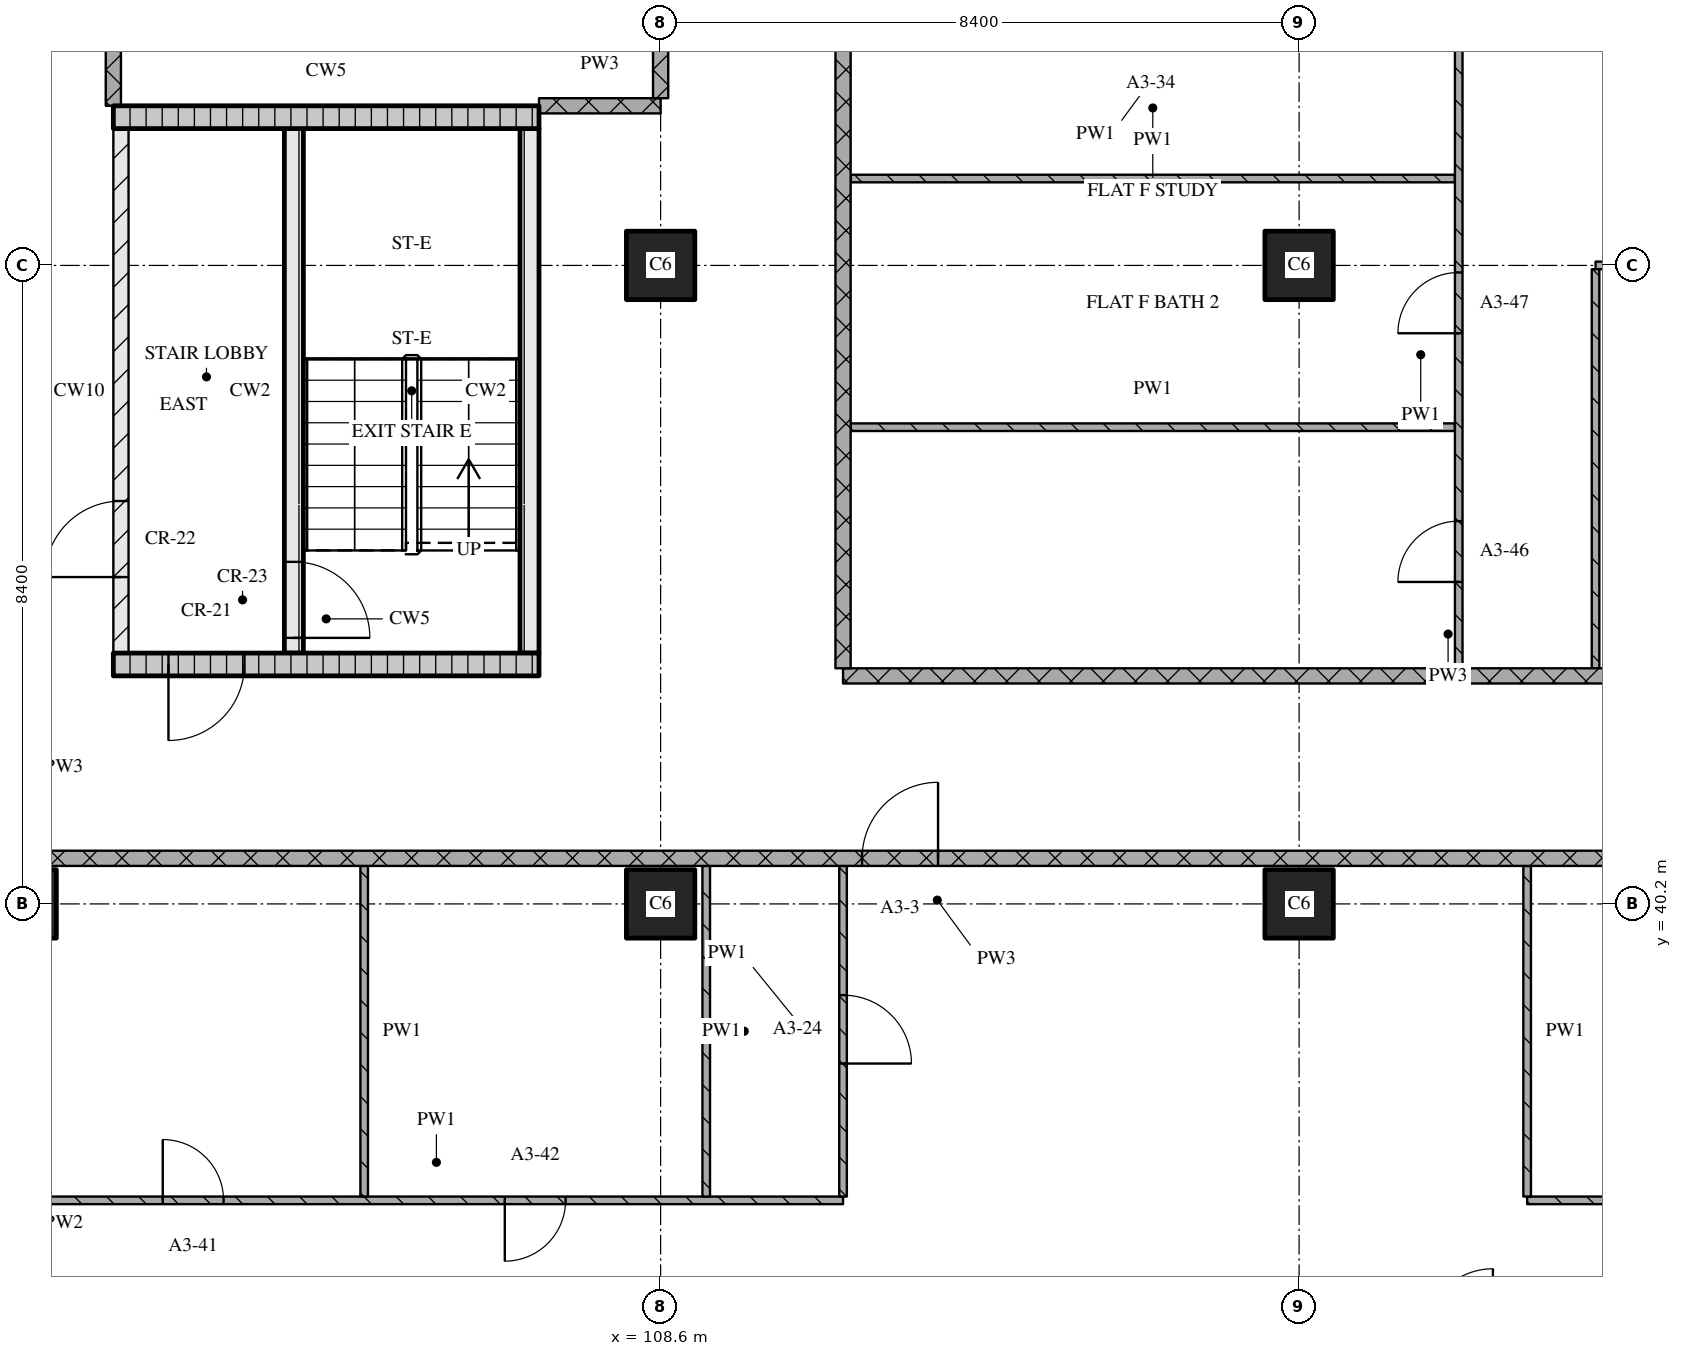
"""IFC4 building model, lengths in metres.
Left out: names, types, materials, properties, quantities, classifications, styles, units other than length and angle.
Written with IfcOpenShell. Run it as: python <this file> out.ifc"""

import sys

from ifc_helpers import new_model, si_unit, direction, frame, frame_2d, origin, origin_2d, place, context, subcontext, project, spatial, rectangle, extrude, element, fill, save


model = new_model("IFC4")
c1 = context("Model", 3, precision=1e-05, world=origin(), true_north=direction((0.0, 1.0)))
c2 = subcontext(c1, "Body", "Model", "MODEL_VIEW")
j1 = project(units=[si_unit("LENGTHUNIT", "METRE"), si_unit("PLANEANGLEUNIT", "RADIAN")], contexts=[c1])
p1 = place(None, origin())
s1 = spatial("IfcSite", under=j1, at=p1, CompositionType="ELEMENT")
p2 = place(p1, origin())
s2 = spatial("IfcBuilding", under=s1, at=p2, CompositionType="ELEMENT")
p3 = place(p2, frame((0.0, 0.0, 58.8)))
s3 = spatial("IfcBuildingStorey", under=s2, at=p3, CompositionType="ELEMENT", Elevation=58.8)
for number, where, z_axis, x_axis in (
    (1, (100.2, 40.2, 0.0), (0.0, 0.0, 1.0), (1.0, 0.0, 0.0)),
    (2, (108.6, 40.2, 0.0), (0.0, 0.0, 1.0), (1.0, 0.0, 0.0)),
    (3, (108.6, 48.6, 0.0), (0.0, 0.0, 1.0), (1.0, 0.0, 0.0)),
    (4, (117.0, 40.2, 0.0), (0.0, 0.0, 1.0), (1.0, 0.0, 0.0)),
    (5, (117.0, 48.6, 0.0), (0.0, 0.0, 1.0), (1.0, 0.0, 0.0)),
):
    element("IfcColumn", number, at=place(p3, frame(where, z_axis=z_axis, x_axis=x_axis)), inside=s3, PredefinedType="COLUMN", context=c2, shape_type="SweptSolid", body=[
        extrude(rectangle(XDim=0.9, YDim=0.9, at=origin_2d()), origin(), (0.0, 0.0, 1.0), 3.6),
    ])
p4 = place(p3, frame((101.4, 43.35, 0.0), z_axis=(0.0, 0.0, 1.0), x_axis=(1.0, 0.0, 0.0)))
e6 = element("IfcWall", 6, at=p4, inside=s3, PredefinedType="SOLIDWALL", context=c2, shape_type="SweptSolid", body=[
    extrude(rectangle(XDim=5.6, YDim=0.3, at=frame_2d((2.8, 0.0))), origin(), (0.0, 0.0, 1.0), 3.32),
])
p5 = place(p4, frame((0.725, 0.0, 0.0)))
e7 = element("IfcOpeningElement", 7, at=p5, cuts=e6, PredefinedType="OPENING", context=c2, shape_type="SweptSolid", body=[
    extrude(rectangle(XDim=1.0, YDim=2.1, at=frame_2d((0.5, 1.05))), frame((0.0, 0.16, 0.0), z_axis=(0.0, -1.0, 0.0), x_axis=(1.0, 0.0, 0.0)), (0.0, 0.0, 1.0), 0.32),
])
p6 = place(p3, frame((101.5, 43.5, 0.0), z_axis=(0.0, 0.0, 1.0), x_axis=(0.0, 1.0, 0.0)))
e8 = element("IfcWall", 8, at=p6, inside=s3, PredefinedType="PARTITIONING", context=c2, shape_type="SweptSolid", body=[
    extrude(rectangle(XDim=6.9, YDim=0.2, at=frame_2d((3.45, 0.0))), origin(), (0.0, 0.0, 1.0), 3.32),
])
p7 = place(p6, frame((1.0, 0.0, 0.0)))
e9 = element("IfcOpeningElement", 9, at=p7, cuts=e8, PredefinedType="OPENING", context=c2, shape_type="SweptSolid", body=[
    extrude(rectangle(XDim=1.0, YDim=2.1, at=frame_2d((0.5, 1.05))), frame((0.0, 0.11, 0.0), z_axis=(0.0, -1.0, 0.0), x_axis=(1.0, 0.0, 0.0)), (0.0, 0.0, 1.0), 0.22),
])
p8 = place(p3, frame((103.775, 43.5, 0.0), z_axis=(0.0, 0.0, 1.0), x_axis=(0.0, 1.0, 0.0)))
e10 = element("IfcWall", 10, at=p8, inside=s3, PredefinedType="SOLIDWALL", context=c2, shape_type="SweptSolid", body=[
    extrude(rectangle(XDim=6.9, YDim=0.25, at=frame_2d((3.45, 0.0))), origin(), (0.0, 0.0, 1.0), 3.32),
])
p9 = place(p8, frame((0.2, 0.0, 0.0)))
e11 = element("IfcOpeningElement", 11, at=p9, cuts=e10, PredefinedType="OPENING", context=c2, shape_type="SweptSolid", body=[
    extrude(rectangle(XDim=1.0, YDim=2.1, at=frame_2d((0.5, 1.05))), frame((0.0, 0.135, 0.0), z_axis=(0.0, -1.0, 0.0), x_axis=(1.0, 0.0, 0.0)), (0.0, 0.0, 1.0), 0.27),
])
p10 = place(p3, frame((106.875, 43.5, 0.0), z_axis=(0.0, 0.0, 1.0), x_axis=(0.0, 1.0, 0.0)))
e12 = element("IfcWall", 12, at=p10, inside=s3, PredefinedType="SOLIDWALL", context=c2, shape_type="SweptSolid", body=[
    extrude(rectangle(XDim=6.9, YDim=0.25, at=frame_2d((3.45, 0.0))), origin(), (0.0, 0.0, 1.0), 3.32),
])
p11 = place(p3, frame((101.4, 50.55, 0.0), z_axis=(0.0, 0.0, 1.0), x_axis=(1.0, 0.0, 0.0)))
e13 = element("IfcWall", 13, at=p11, inside=s3, PredefinedType="SOLIDWALL", context=c2, shape_type="SweptSolid", body=[
    extrude(rectangle(XDim=5.6, YDim=0.3, at=frame_2d((2.8, 0.0))), origin(), (0.0, 0.0, 1.0), 3.32),
])
p12 = place(p3, frame((100.3, 36.3, 0.0), z_axis=(0.0, 0.0, 1.0), x_axis=(1.0, 0.0, 0.0)))
e14 = element("IfcWall", 14, at=p12, inside=s3, PredefinedType="PARTITIONING", context=c2, shape_type="SweptSolid", body=[
    extrude(rectangle(XDim=10.7, YDim=0.1, at=frame_2d((5.35, 0.0))), origin(), (0.0, 0.0, 1.0), 3.32),
])
p13 = place(p12, frame((1.75, 0.0, 0.0)))
e15 = element("IfcOpeningElement", 15, at=p13, cuts=e14, PredefinedType="OPENING", context=c2, shape_type="SweptSolid", body=[
    extrude(rectangle(XDim=0.8, YDim=2.1, at=frame_2d((0.4, 1.05))), frame((0.0, 0.06, 0.0), z_axis=(0.0, -1.0, 0.0), x_axis=(1.0, 0.0, 0.0)), (0.0, 0.0, 1.0), 0.12),
])
p14 = place(p12, frame((6.25, 0.0, 0.0)))
e16 = element("IfcOpeningElement", 16, at=p14, cuts=e14, PredefinedType="OPENING", context=c2, shape_type="SweptSolid", body=[
    extrude(rectangle(XDim=0.8, YDim=2.1, at=frame_2d((0.4, 1.05))), frame((0.0, 0.06, 0.0), z_axis=(0.0, -1.0, 0.0), x_axis=(1.0, 0.0, 0.0)), (0.0, 0.0, 1.0), 0.12),
])
p15 = place(p3, frame((120.0, 36.3, 0.0), z_axis=(0.0, 0.0, 1.0), x_axis=(1.0, 0.0, 0.0)))
e17 = element("IfcWall", 17, at=p15, inside=s3, PredefinedType="PARTITIONING", context=c2, shape_type="SweptSolid", body=[
    extrude(rectangle(XDim=6.92, YDim=0.1, at=frame_2d((3.46, 0.0))), origin(), (0.0, 0.0, 1.0), 3.32),
])
p16 = place(p15, frame((3.15, 0.0, 0.0)))
e18 = element("IfcOpeningElement", 18, at=p16, cuts=e17, PredefinedType="OPENING", context=c2, shape_type="SweptSolid", body=[
    extrude(rectangle(XDim=0.9, YDim=2.1, at=frame_2d((0.45, 1.05))), frame((0.0, 0.06, 0.0), z_axis=(0.0, -1.0, 0.0), x_axis=(1.0, 0.0, 0.0)), (0.0, 0.0, 1.0), 0.12),
])
p17 = place(p3, frame((124.28, 40.8, 0.0), z_axis=(0.0, 0.0, 1.0), x_axis=(-1.0, 0.0, 0.0)))
e19 = element("IfcWall", 19, at=p17, inside=s3, PredefinedType="PARTITIONING", context=c2, shape_type="SweptSolid", body=[
    extrude(rectangle(XDim=24.08, YDim=0.2, at=frame_2d((12.04, 0.0))), origin(), (0.0, 0.0, 1.0), 3.32),
])
p18 = place(p17, frame((12.03, 0.0, 0.0)))
e20 = element("IfcOpeningElement", 20, at=p18, cuts=e19, PredefinedType="OPENING", context=c2, shape_type="SweptSolid", body=[
    extrude(rectangle(XDim=1.0, YDim=2.1, at=frame_2d((0.5, 1.05))), frame((0.0, 0.11, 0.0), z_axis=(0.0, -1.0, 0.0), x_axis=(1.0, 0.0, 0.0)), (0.0, 0.0, 1.0), 0.22),
])
p19 = place(p3, frame((111.0, 43.2, 0.0), z_axis=(0.0, 0.0, 1.0), x_axis=(1.0, 0.0, 0.0)))
e21 = element("IfcWall", 21, at=p19, inside=s3, PredefinedType="PARTITIONING", context=c2, shape_type="SweptSolid", body=[
    extrude(rectangle(XDim=15.92, YDim=0.2, at=frame_2d((7.96, 0.0))), origin(), (0.0, 0.0, 1.0), 3.32),
])
p20 = place(p3, frame((111.1, 46.472, 0.0), z_axis=(0.0, 0.0, 1.0), x_axis=(1.0, 0.0, 0.0)))
e22 = element("IfcWall", 22, at=p20, inside=s3, PredefinedType="PARTITIONING", context=c2, shape_type="SweptSolid", body=[
    extrude(rectangle(XDim=7.95, YDim=0.1, at=frame_2d((3.975, 0.0))), origin(), (0.0, 0.0, 1.0), 3.32),
])
p21 = place(p3, frame((124.93, 48.6, 0.0), z_axis=(0.0, 0.0, 1.0), x_axis=(-1.0, 0.0, 0.0)))
e23 = element("IfcWall", 23, at=p21, inside=s3, PredefinedType="PARTITIONING", context=c2, shape_type="SweptSolid", body=[
    extrude(rectangle(XDim=4.03, YDim=0.1, at=frame_2d((2.015, 0.0))), origin(), (0.0, 0.0, 1.0), 3.32),
])
p22 = place(p21, frame((0.43, 0.0, 0.0)))
e24 = element("IfcOpeningElement", 24, at=p22, cuts=e23, PredefinedType="OPENING", context=c2, shape_type="SweptSolid", body=[
    extrude(rectangle(XDim=0.9, YDim=2.1, at=frame_2d((0.45, 1.05))), frame((0.0, 0.06, 0.0), z_axis=(0.0, -1.0, 0.0), x_axis=(1.0, 0.0, 0.0)), (0.0, 0.0, 1.0), 0.12),
])
p23 = place(p3, frame((111.1, 49.743, 0.0), z_axis=(0.0, 0.0, 1.0), x_axis=(1.0, 0.0, 0.0)))
e25 = element("IfcWall", 25, at=p23, inside=s3, PredefinedType="PARTITIONING", context=c2, shape_type="SweptSolid", body=[
    extrude(rectangle(XDim=7.95, YDim=0.1, at=frame_2d((3.975, 0.0))), origin(), (0.0, 0.0, 1.0), 3.32),
])
p24 = place(p3, frame((107.0, 50.7, 0.0), z_axis=(0.0, 0.0, 1.0), x_axis=(1.0, 0.0, 0.0)))
e26 = element("IfcWall", 26, at=p24, inside=s3, PredefinedType="PARTITIONING", context=c2, shape_type="SweptSolid", body=[
    extrude(rectangle(XDim=1.6, YDim=0.2, at=frame_2d((0.8, 0.0))), origin(), (0.0, 0.0, 1.0), 3.32),
])
p25 = place(p3, frame((101.4, 58.7, 0.0), z_axis=(0.0, 0.0, 1.0), x_axis=(0.0, -1.0, 0.0)))
e27 = element("IfcWall", 27, at=p25, inside=s3, PredefinedType="PARTITIONING", context=c2, shape_type="SweptSolid", body=[
    extrude(rectangle(XDim=8.0, YDim=0.2, at=frame_2d((4.0, 0.0))), origin(), (0.0, 0.0, 1.0), 3.32),
])
p26 = place(p3, frame((104.7, 40.7, 0.0), z_axis=(0.0, 0.0, 1.0), x_axis=(0.0, -1.0, 0.0)))
e28 = element("IfcWall", 28, at=p26, inside=s3, PredefinedType="PARTITIONING", context=c2, shape_type="SweptSolid", body=[
    extrude(rectangle(XDim=4.35, YDim=0.1, at=frame_2d((2.175, 0.0))), origin(), (0.0, 0.0, 1.0), 3.32),
])
p27 = place(p3, frame((108.6, 50.8, 0.0), z_axis=(0.0, 0.0, 1.0), x_axis=(0.0, 1.0, 0.0)))
e29 = element("IfcWall", 29, at=p27, inside=s3, PredefinedType="PARTITIONING", context=c2, shape_type="SweptSolid", body=[
    extrude(rectangle(XDim=5.73, YDim=0.2, at=frame_2d((2.865, 0.0))), origin(), (0.0, 0.0, 1.0), 3.32),
])
p28 = place(p27, frame((2.05, 0.0, 0.0)))
e30 = element("IfcOpeningElement", 30, at=p28, cuts=e29, PredefinedType="OPENING", context=c2, shape_type="SweptSolid", body=[
    extrude(rectangle(XDim=1.2, YDim=2.1, at=frame_2d((0.6, 1.05))), frame((0.0, 0.11, 0.0), z_axis=(0.0, -1.0, 0.0), x_axis=(1.0, 0.0, 0.0)), (0.0, 0.0, 1.0), 0.22),
])
p29 = place(p3, frame((109.2, 40.7, 0.0), z_axis=(0.0, 0.0, 1.0), x_axis=(0.0, -1.0, 0.0)))
e31 = element("IfcWall", 31, at=p29, inside=s3, PredefinedType="PARTITIONING", context=c2, shape_type="SweptSolid", body=[
    extrude(rectangle(XDim=4.35, YDim=0.1, at=frame_2d((2.175, 0.0))), origin(), (0.0, 0.0, 1.0), 3.32),
])
p30 = place(p3, frame((111.0, 75.32, 0.0), z_axis=(0.0, 0.0, 1.0), x_axis=(0.0, -1.0, 0.0)))
e32 = element("IfcWall", 32, at=p30, inside=s3, PredefinedType="PARTITIONING", context=c2, shape_type="SweptSolid", body=[
    extrude(rectangle(XDim=32.02, YDim=0.2, at=frame_2d((16.01, 0.0))), origin(), (0.0, 0.0, 1.0), 3.32),
])
p31 = place(p30, frame((6.27, 0.0, 0.0)))
e33 = element("IfcOpeningElement", 33, at=p31, cuts=e32, PredefinedType="OPENING", context=c2, shape_type="SweptSolid", body=[
    extrude(rectangle(XDim=1.0, YDim=2.1, at=frame_2d((0.5, 1.05))), frame((0.0, 0.11, 0.0), z_axis=(0.0, -1.0, 0.0), x_axis=(1.0, 0.0, 0.0)), (0.0, 0.0, 1.0), 0.22),
])
p32 = place(p30, frame((22.47, 0.0, 0.0)))
e34 = element("IfcOpeningElement", 34, at=p32, cuts=e32, PredefinedType="OPENING", context=c2, shape_type="SweptSolid", body=[
    extrude(rectangle(XDim=1.0, YDim=2.1, at=frame_2d((0.5, 1.05))), frame((0.0, 0.11, 0.0), z_axis=(0.0, -1.0, 0.0), x_axis=(1.0, 0.0, 0.0)), (0.0, 0.0, 1.0), 0.22),
])
p33 = place(p3, frame((111.0, 36.35, 0.0), z_axis=(0.0, 0.0, 1.0), x_axis=(0.0, 1.0, 0.0)))
e35 = element("IfcWall", 35, at=p33, inside=s3, PredefinedType="PARTITIONING", context=c2, shape_type="SweptSolid", body=[
    extrude(rectangle(XDim=4.35, YDim=0.1, at=frame_2d((2.175, 0.0))), origin(), (0.0, 0.0, 1.0), 3.32),
])
p34 = place(p33, frame((1.75, 0.0, 0.0)))
e36 = element("IfcOpeningElement", 36, at=p34, cuts=e35, PredefinedType="OPENING", context=c2, shape_type="SweptSolid", body=[
    extrude(rectangle(XDim=0.9, YDim=2.1, at=frame_2d((0.45, 1.05))), frame((0.0, 0.06, 0.0), z_axis=(0.0, -1.0, 0.0), x_axis=(1.0, 0.0, 0.0)), (0.0, 0.0, 1.0), 0.12),
])
p35 = place(p3, frame((119.1, 43.3, 0.0), z_axis=(0.0, 0.0, 1.0), x_axis=(0.0, 1.0, 0.0)))
e37 = element("IfcWall", 37, at=p35, inside=s3, PredefinedType="PARTITIONING", context=c2, shape_type="SweptSolid", body=[
    extrude(rectangle(XDim=8.25, YDim=0.1, at=frame_2d((4.125, 0.0))), origin(), (0.0, 0.0, 1.0), 3.32),
])
p36 = place(p35, frame((1.136, 0.0, 0.0)))
e38 = element("IfcOpeningElement", 38, at=p36, cuts=e37, PredefinedType="OPENING", context=c2, shape_type="SweptSolid", body=[
    extrude(rectangle(XDim=0.8, YDim=2.1, at=frame_2d((0.4, 1.05))), frame((0.0, 0.06, 0.0), z_axis=(0.0, -1.0, 0.0), x_axis=(1.0, 0.0, 0.0)), (0.0, 0.0, 1.0), 0.12),
])
p37 = place(p35, frame((4.407, 0.0, 0.0)))
e39 = element("IfcOpeningElement", 39, at=p37, cuts=e37, PredefinedType="OPENING", context=c2, shape_type="SweptSolid", body=[
    extrude(rectangle(XDim=0.8, YDim=2.1, at=frame_2d((0.4, 1.05))), frame((0.0, 0.06, 0.0), z_axis=(0.0, -1.0, 0.0), x_axis=(1.0, 0.0, 0.0)), (0.0, 0.0, 1.0), 0.12),
])
p38 = place(p3, frame((120.0, 40.7, 0.0), z_axis=(0.0, 0.0, 1.0), x_axis=(0.0, -1.0, 0.0)))
e40 = element("IfcWall", 40, at=p38, inside=s3, PredefinedType="PARTITIONING", context=c2, shape_type="SweptSolid", body=[
    extrude(rectangle(XDim=4.35, YDim=0.1, at=frame_2d((2.175, 0.0))), origin(), (0.0, 0.0, 1.0), 3.32),
])
p39 = place(p3, frame((120.9, 48.55, 0.0), z_axis=(0.0, 0.0, 1.0), x_axis=(0.0, -1.0, 0.0)))
e41 = element("IfcWall", 41, at=p39, inside=s3, PredefinedType="PARTITIONING", context=c2, shape_type="SweptSolid", body=[
    extrude(rectangle(XDim=5.25, YDim=0.1, at=frame_2d((2.625, 0.0))), origin(), (0.0, 0.0, 1.0), 3.32),
])
p40 = place(p5, origin())
e42 = element("IfcDoor", 42, at=p40, inside=s3, OperationType="SINGLE_SWING_RIGHT", PredefinedType="DOOR", context=c2, shape_type="SweptSolid", body=[
    extrude(rectangle(XDim=1.0, YDim=2.1, at=frame_2d((0.5, 1.05))), frame((0.0, 0.025, 0.0), z_axis=(0.0, -1.0, 0.0), x_axis=(1.0, 0.0, 0.0)), (0.0, 0.0, 1.0), 0.05),
])
fill(e7, e42)
p41 = place(p9, origin())
e43 = element("IfcDoor", 43, at=p41, inside=s3, OperationType="SINGLE_SWING_RIGHT", PredefinedType="DOOR", context=c2, shape_type="SweptSolid", body=[
    extrude(rectangle(XDim=1.0, YDim=2.1, at=frame_2d((0.5, 1.05))), frame((0.0, 0.025, 0.0), z_axis=(0.0, -1.0, 0.0), x_axis=(1.0, 0.0, 0.0)), (0.0, 0.0, 1.0), 0.05),
])
fill(e11, e43)
p42 = place(p7, origin())
e44 = element("IfcDoor", 44, at=p42, inside=s3, OperationType="SINGLE_SWING_LEFT", PredefinedType="DOOR", context=c2, shape_type="SweptSolid", body=[
    extrude(rectangle(XDim=1.0, YDim=2.1, at=frame_2d((0.5, 1.05))), frame((0.0, 0.025, 0.0), z_axis=(0.0, -1.0, 0.0), x_axis=(1.0, 0.0, 0.0)), (0.0, 0.0, 1.0), 0.05),
])
fill(e9, e44)
p43 = place(p13, origin())
e45 = element("IfcDoor", 45, at=p43, inside=s3, OperationType="SINGLE_SWING_LEFT", PredefinedType="DOOR", context=c2, shape_type="SweptSolid", body=[
    extrude(rectangle(XDim=0.8, YDim=2.1, at=frame_2d((0.4, 1.05))), frame((0.0, 0.025, 0.0), z_axis=(0.0, -1.0, 0.0), x_axis=(1.0, 0.0, 0.0)), (0.0, 0.0, 1.0), 0.05),
])
fill(e15, e45)
p44 = place(p14, origin())
e46 = element("IfcDoor", 46, at=p44, inside=s3, OperationType="SINGLE_SWING_RIGHT", PredefinedType="DOOR", context=c2, shape_type="SweptSolid", body=[
    extrude(rectangle(XDim=0.8, YDim=2.1, at=frame_2d((0.4, 1.05))), frame((0.0, 0.025, 0.0), z_axis=(0.0, -1.0, 0.0), x_axis=(1.0, 0.0, 0.0)), (0.0, 0.0, 1.0), 0.05),
])
fill(e16, e46)
p45 = place(p18, origin())
e47 = element("IfcDoor", 47, at=p45, inside=s3, OperationType="SINGLE_SWING_RIGHT", PredefinedType="DOOR", context=c2, shape_type="SweptSolid", body=[
    extrude(rectangle(XDim=1.0, YDim=2.1, at=frame_2d((0.5, 1.05))), frame((0.0, 0.025, 0.0), z_axis=(0.0, -1.0, 0.0), x_axis=(1.0, 0.0, 0.0)), (0.0, 0.0, 1.0), 0.05),
])
fill(e20, e47)
p46 = place(p34, origin())
e48 = element("IfcDoor", 48, at=p46, inside=s3, OperationType="SINGLE_SWING_RIGHT", PredefinedType="DOOR", context=c2, shape_type="SweptSolid", body=[
    extrude(rectangle(XDim=0.9, YDim=2.1, at=frame_2d((0.45, 1.05))), frame((0.0, 0.025, 0.0), z_axis=(0.0, -1.0, 0.0), x_axis=(1.0, 0.0, 0.0)), (0.0, 0.0, 1.0), 0.05),
])
fill(e36, e48)
p47 = place(p36, origin())
e49 = element("IfcDoor", 49, at=p47, inside=s3, OperationType="SINGLE_SWING_LEFT", PredefinedType="DOOR", context=c2, shape_type="SweptSolid", body=[
    extrude(rectangle(XDim=0.8, YDim=2.1, at=frame_2d((0.4, 1.05))), frame((0.0, 0.025, 0.0), z_axis=(0.0, -1.0, 0.0), x_axis=(1.0, 0.0, 0.0)), (0.0, 0.0, 1.0), 0.05),
])
fill(e38, e49)
p48 = place(p37, origin())
e50 = element("IfcDoor", 50, at=p48, inside=s3, OperationType="SINGLE_SWING_LEFT", PredefinedType="DOOR", context=c2, shape_type="SweptSolid", body=[
    extrude(rectangle(XDim=0.8, YDim=2.1, at=frame_2d((0.4, 1.05))), frame((0.0, 0.025, 0.0), z_axis=(0.0, -1.0, 0.0), x_axis=(1.0, 0.0, 0.0)), (0.0, 0.0, 1.0), 0.05),
])
fill(e39, e50)
save(model, sys.argv[1])
